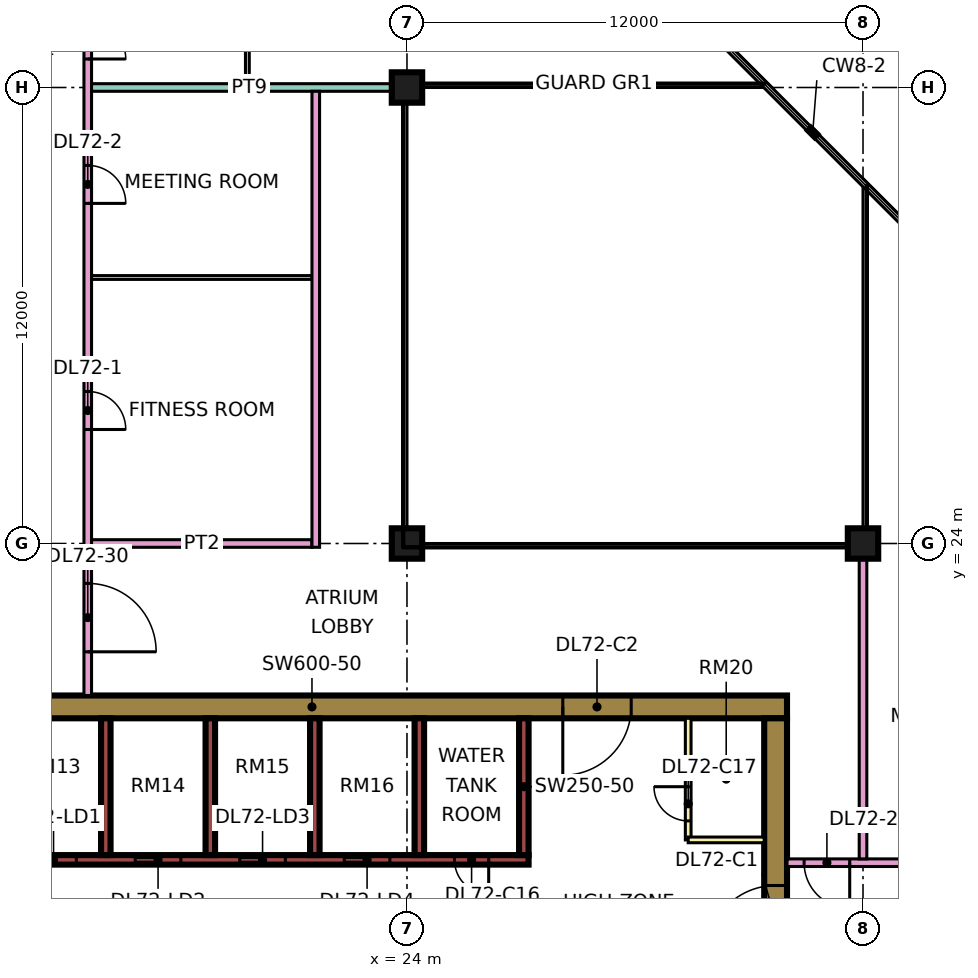
"""IFC4 building model, lengths in metres.
Left out: names, types, materials, properties, quantities, classifications, styles, units other than length and angle.
Written with IfcOpenShell. Run it as: python <this file> out.ifc"""

import sys

from ifc_helpers import new_model, si_unit, direction, frame, frame_2d, origin, origin_2d, place, context, subcontext, project, spatial, rectangle, extrude, element, fill, save


model = new_model("IFC4")
c1 = context("Model", 3, precision=1e-05, world=origin(), true_north=direction((0.0, 1.0)))
c2 = subcontext(c1, "Body", "Model", "MODEL_VIEW")
j1 = project(units=[si_unit("LENGTHUNIT", "METRE"), si_unit("PLANEANGLEUNIT", "RADIAN")], contexts=[c1])
p1 = place(None, origin())
s1 = spatial("IfcSite", under=j1, at=p1, CompositionType="ELEMENT")
p2 = place(p1, origin())
s2 = spatial("IfcBuilding", under=s1, at=p2, CompositionType="ELEMENT")
p3 = place(p2, frame((0.0, 0.0, 307.15)))
s3 = spatial("IfcBuildingStorey", under=s2, at=p3, CompositionType="ELEMENT", Elevation=307.15)
for number, where, z_axis, x_axis in (
    (1, (24.0, 24.0, 0.0), (0.0, 0.0, 1.0), (1.0, 0.0, 0.0)),
    (2, (24.0, 36.0, 0.0), (0.0, 0.0, 1.0), (1.0, 0.0, 0.0)),
    (3, (36.0, 24.0, 0.0), (0.0, 0.0, 1.0), (1.0, 0.0, 0.0)),
):
    element("IfcColumn", number, at=place(p3, frame(where, z_axis=z_axis, x_axis=x_axis)), inside=s3, PredefinedType="COLUMN", context=c2, shape_type="SweptSolid", body=[
        extrude(rectangle(XDim=0.8, YDim=0.8, at=origin_2d()), origin(), (0.0, 0.0, 1.0), 3.75),
    ])
p4 = place(p3, frame((9.0, 19.7, 0.0), z_axis=(0.0, 0.0, 1.0), x_axis=(1.0, 0.0, 0.0)))
e4 = element("IfcWall", 4, at=p4, inside=s3, PredefinedType="SHEAR", context=c2, shape_type="SweptSolid", body=[
    extrude(rectangle(XDim=25.0, YDim=0.6, at=frame_2d((12.5, 0.0))), origin(), (0.0, 0.0, 1.0), 3.75),
])
p5 = place(p4, frame((19.1, 0.0, 0.0)))
e5 = element("IfcOpeningElement", 5, at=p5, cuts=e4, PredefinedType="OPENING", context=c2, shape_type="SweptSolid", body=[
    extrude(rectangle(XDim=1.8, YDim=2.4, at=frame_2d((0.9, 1.2))), frame((0.0, 0.31, 0.0), z_axis=(0.0, -1.0, 0.0), x_axis=(1.0, 0.0, 0.0)), (0.0, 0.0, 1.0), 0.62),
])
p6 = place(p3, frame((33.7, 7.6, 0.0), z_axis=(0.0, 0.0, 1.0), x_axis=(0.0, 1.0, 0.0)))
e6 = element("IfcWall", 6, at=p6, inside=s3, PredefinedType="SHEAR", context=c2, shape_type="SweptSolid", body=[
    extrude(rectangle(XDim=11.8, YDim=0.6, at=frame_2d((5.9, 0.0))), origin(), (0.0, 0.0, 1.0), 3.75),
])
p7 = place(p6, frame((5.6, 0.0, 0.0)))
e7 = element("IfcOpeningElement", 7, at=p7, cuts=e6, PredefinedType="OPENING", context=c2, shape_type="SweptSolid", body=[
    extrude(rectangle(XDim=1.8, YDim=2.4, at=frame_2d((0.9, 1.2))), frame((0.0, 0.31, 0.0), z_axis=(0.0, -1.0, 0.0), x_axis=(1.0, 0.0, 0.0)), (0.0, 0.0, 1.0), 0.62),
])
p8 = place(p3, frame((13.45, 15.675, 0.0), z_axis=(0.0, 0.0, 1.0), x_axis=(1.0, 0.0, 0.0)))
e8 = element("IfcWall", 8, at=p8, inside=s3, PredefinedType="SHEAR", context=c2, shape_type="SweptSolid", body=[
    extrude(rectangle(XDim=13.75, YDim=0.25, at=frame_2d((6.875, 0.0))), origin(), (0.0, 0.0, 1.0), 3.75),
])
p9 = place(p8, frame((0.65, 0.0, 0.0)))
e9 = element("IfcOpeningElement", 9, at=p9, cuts=e8, PredefinedType="OPENING", context=c2, shape_type="SweptSolid", body=[
    extrude(rectangle(XDim=1.2, YDim=2.2, at=frame_2d((0.6, 1.1))), frame((0.0, 0.135, 0.0), z_axis=(0.0, -1.0, 0.0), x_axis=(1.0, 0.0, 0.0)), (0.0, 0.0, 1.0), 0.27),
])
p10 = place(p8, frame((3.4, 0.0, 0.0)))
e10 = element("IfcOpeningElement", 10, at=p10, cuts=e8, PredefinedType="OPENING", context=c2, shape_type="SweptSolid", body=[
    extrude(rectangle(XDim=1.2, YDim=2.2, at=frame_2d((0.6, 1.1))), frame((0.0, 0.135, 0.0), z_axis=(0.0, -1.0, 0.0), x_axis=(1.0, 0.0, 0.0)), (0.0, 0.0, 1.0), 0.27),
])
p11 = place(p8, frame((6.15, 0.0, 0.0)))
e11 = element("IfcOpeningElement", 11, at=p11, cuts=e8, PredefinedType="OPENING", context=c2, shape_type="SweptSolid", body=[
    extrude(rectangle(XDim=1.2, YDim=2.2, at=frame_2d((0.6, 1.1))), frame((0.0, 0.135, 0.0), z_axis=(0.0, -1.0, 0.0), x_axis=(1.0, 0.0, 0.0)), (0.0, 0.0, 1.0), 0.27),
])
p12 = place(p8, frame((8.9, 0.0, 0.0)))
e12 = element("IfcOpeningElement", 12, at=p12, cuts=e8, PredefinedType="OPENING", context=c2, shape_type="SweptSolid", body=[
    extrude(rectangle(XDim=1.2, YDim=2.2, at=frame_2d((0.6, 1.1))), frame((0.0, 0.135, 0.0), z_axis=(0.0, -1.0, 0.0), x_axis=(1.0, 0.0, 0.0)), (0.0, 0.0, 1.0), 0.27),
])
p13 = place(p8, frame((11.8, 0.0, 0.0)))
e13 = element("IfcOpeningElement", 13, at=p13, cuts=e8, PredefinedType="OPENING", context=c2, shape_type="SweptSolid", body=[
    extrude(rectangle(XDim=0.9, YDim=2.1, at=frame_2d((0.45, 1.05))), frame((0.0, 0.135, 0.0), z_axis=(0.0, -1.0, 0.0), x_axis=(1.0, 0.0, 0.0)), (0.0, 0.0, 1.0), 0.27),
])
for number, where, z_axis, x_axis in (
    (14, (16.075, 15.8, 0.0), (0.0, 0.0, 1.0), (0.0, 1.0, 0.0)),
    (15, (18.825, 15.8, 0.0), (0.0, 0.0, 1.0), (0.0, 1.0, 0.0)),
    (16, (21.575, 15.8, 0.0), (0.0, 0.0, 1.0), (0.0, 1.0, 0.0)),
    (17, (24.325, 15.8, 0.0), (0.0, 0.0, 1.0), (0.0, 1.0, 0.0)),
    (18, (27.075, 15.8, 0.0), (0.0, 0.0, 1.0), (0.0, 1.0, 0.0)),
):
    element("IfcWall", number, at=place(p3, frame(where, z_axis=z_axis, x_axis=x_axis)), inside=s3, PredefinedType="SHEAR", context=c2, shape_type="SweptSolid", body=[
        extrude(rectangle(XDim=3.6, YDim=0.25, at=frame_2d((1.8, 0.0))), origin(), (0.0, 0.0, 1.0), 3.75),
    ])
p14 = place(p3, frame((31.4, 16.2, 0.0), z_axis=(0.0, 0.0, 1.0), x_axis=(0.0, 1.0, 0.0)))
e19 = element("IfcWall", 19, at=p14, inside=s3, PredefinedType="PARTITIONING", context=c2, shape_type="SweptSolid", body=[
    extrude(rectangle(XDim=3.2, YDim=0.15, at=frame_2d((1.6, 0.0))), origin(), (0.0, 0.0, 1.0), 3.35),
])
p15 = place(p14, frame((0.5, 0.0, 0.0)))
e20 = element("IfcOpeningElement", 20, at=p15, cuts=e19, PredefinedType="OPENING", context=c2, shape_type="SweptSolid", body=[
    extrude(rectangle(XDim=0.9, YDim=2.1, at=frame_2d((0.45, 1.05))), frame((0.0, 0.085, 0.0), z_axis=(0.0, -1.0, 0.0), x_axis=(1.0, 0.0, 0.0)), (0.0, 0.0, 1.0), 0.17),
])
p16 = place(p3, frame((31.4, 16.2, 0.0), z_axis=(0.0, 0.0, 1.0), x_axis=(1.0, 0.0, 0.0)))
e21 = element("IfcWall", 21, at=p16, inside=s3, PredefinedType="PARTITIONING", context=c2, shape_type="SweptSolid", body=[
    extrude(rectangle(XDim=2.0, YDim=0.15, at=frame_2d((1.0, 0.0))), origin(), (0.0, 0.0, 1.0), 3.35),
])
p17 = place(p3, frame((15.6, 20.0, 0.0), z_axis=(0.0, 0.0, 1.0), x_axis=(0.0, 1.0, 0.0)))
e22 = element("IfcWall", 22, at=p17, inside=s3, PredefinedType="PARTITIONING", context=c2, shape_type="SweptSolid", body=[
    extrude(rectangle(XDim=27.775, YDim=0.2, at=frame_2d((13.887, 0.0))), origin(), (0.0, 0.0, 1.0), 3.35),
])
p18 = place(p17, frame((7.0, 0.0, 0.0)))
e23 = element("IfcOpeningElement", 23, at=p18, cuts=e22, PredefinedType="OPENING", context=c2, shape_type="SweptSolid", body=[
    extrude(rectangle(XDim=1.0, YDim=2.1, at=frame_2d((0.5, 1.05))), frame((0.0, 0.11, 0.0), z_axis=(0.0, -1.0, 0.0), x_axis=(1.0, 0.0, 0.0)), (0.0, 0.0, 1.0), 0.22),
])
p19 = place(p17, frame((12.95, 0.0, 0.0)))
e24 = element("IfcOpeningElement", 24, at=p19, cuts=e22, PredefinedType="OPENING", context=c2, shape_type="SweptSolid", body=[
    extrude(rectangle(XDim=1.0, YDim=2.1, at=frame_2d((0.5, 1.05))), frame((0.0, 0.11, 0.0), z_axis=(0.0, -1.0, 0.0), x_axis=(1.0, 0.0, 0.0)), (0.0, 0.0, 1.0), 0.22),
])
p20 = place(p17, frame((16.75, 0.0, 0.0)))
e25 = element("IfcOpeningElement", 25, at=p20, cuts=e22, PredefinedType="OPENING", context=c2, shape_type="SweptSolid", body=[
    extrude(rectangle(XDim=1.0, YDim=2.1, at=frame_2d((0.5, 1.05))), frame((0.0, 0.11, 0.0), z_axis=(0.0, -1.0, 0.0), x_axis=(1.0, 0.0, 0.0)), (0.0, 0.0, 1.0), 0.22),
])
p21 = place(p17, frame((1.15, 0.0, 0.0)))
e26 = element("IfcOpeningElement", 26, at=p21, cuts=e22, PredefinedType="OPENING", context=c2, shape_type="SweptSolid", body=[
    extrude(rectangle(XDim=1.8, YDim=2.1, at=frame_2d((0.9, 1.05))), frame((0.0, 0.11, 0.0), z_axis=(0.0, -1.0, 0.0), x_axis=(1.0, 0.0, 0.0)), (0.0, 0.0, 1.0), 0.22),
])
p22 = place(p17, frame((25.9, 0.0, 0.0)))
e27 = element("IfcOpeningElement", 27, at=p22, cuts=e22, PredefinedType="OPENING", context=c2, shape_type="SweptSolid", body=[
    extrude(rectangle(XDim=1.0, YDim=2.1, at=frame_2d((0.5, 1.05))), frame((0.0, 0.11, 0.0), z_axis=(0.0, -1.0, 0.0), x_axis=(1.0, 0.0, 0.0)), (0.0, 0.0, 1.0), 0.22),
])
p23 = place(p3, frame((15.7, 24.0, 0.0), z_axis=(0.0, 0.0, 1.0), x_axis=(1.0, 0.0, 0.0)))
e28 = element("IfcWall", 28, at=p23, inside=s3, PredefinedType="PARTITIONING", context=c2, shape_type="SweptSolid", body=[
    extrude(rectangle(XDim=5.8, YDim=0.2, at=frame_2d((2.9, 0.0))), origin(), (0.0, 0.0, 1.0), 3.35),
])
p24 = place(p3, frame((15.7, 31.0, 0.0), z_axis=(0.0, 0.0, 1.0), x_axis=(1.0, 0.0, 0.0)))
e29 = element("IfcWall", 29, at=p24, inside=s3, PredefinedType="PARTITIONING", context=c2, shape_type="SweptSolid", body=[
    extrude(rectangle(XDim=5.8, YDim=0.1, at=frame_2d((2.9, 0.0))), origin(), (0.0, 0.0, 1.0), 3.35),
])
p25 = place(p3, frame((15.7, 36.0, 0.0), z_axis=(0.0, 0.0, 1.0), x_axis=(1.0, 0.0, 0.0)))
e30 = element("IfcWall", 30, at=p25, inside=s3, PredefinedType="PARTITIONING", context=c2, shape_type="SweptSolid", body=[
    extrude(rectangle(XDim=8.3, YDim=0.2, at=frame_2d((4.15, 0.0))), origin(), (0.0, 0.0, 1.0), 3.35),
])
p26 = place(p3, frame((19.8, 36.1, 0.0), z_axis=(0.0, 0.0, 1.0), x_axis=(0.0, 1.0, 0.0)))
e31 = element("IfcWall", 31, at=p26, inside=s3, PredefinedType="PARTITIONING", context=c2, shape_type="SweptSolid", body=[
    extrude(rectangle(XDim=5.95, YDim=0.1, at=frame_2d((2.975, 0.0))), origin(), (0.0, 0.0, 1.0), 3.35),
])
p27 = place(p26, frame((0.95, 0.0, 0.0)))
e32 = element("IfcOpeningElement", 32, at=p27, cuts=e31, PredefinedType="OPENING", context=c2, shape_type="SweptSolid", body=[
    extrude(rectangle(XDim=0.9, YDim=2.1, at=frame_2d((0.45, 1.05))), frame((0.0, 0.06, 0.0), z_axis=(0.0, -1.0, 0.0), x_axis=(1.0, 0.0, 0.0)), (0.0, 0.0, 1.0), 0.12),
])
p28 = place(p3, frame((21.6, 23.9, 0.0), z_axis=(0.0, 0.0, 1.0), x_axis=(0.0, 1.0, 0.0)))
e33 = element("IfcWall", 33, at=p28, inside=s3, PredefinedType="PARTITIONING", context=c2, shape_type="SweptSolid", body=[
    extrude(rectangle(XDim=12.0, YDim=0.2, at=frame_2d((6.0, 0.0))), origin(), (0.0, 0.0, 1.0), 3.35),
])
p29 = place(p3, frame((34.0, 15.6, 0.0), z_axis=(0.0, 0.0, 1.0), x_axis=(1.0, 0.0, 0.0)))
e34 = element("IfcWall", 34, at=p29, inside=s3, PredefinedType="PARTITIONING", context=c2, shape_type="SweptSolid", body=[
    extrude(rectangle(XDim=10.35, YDim=0.2, at=frame_2d((5.175, 0.0))), origin(), (0.0, 0.0, 1.0), 3.35),
])
p30 = place(p29, frame((5.6, 0.0, 0.0)))
e35 = element("IfcOpeningElement", 35, at=p30, cuts=e34, PredefinedType="OPENING", context=c2, shape_type="SweptSolid", body=[
    extrude(rectangle(XDim=1.0, YDim=2.1, at=frame_2d((0.5, 1.05))), frame((0.0, 0.11, 0.0), z_axis=(0.0, -1.0, 0.0), x_axis=(1.0, 0.0, 0.0)), (0.0, 0.0, 1.0), 0.22),
])
p31 = place(p29, frame((0.45, 0.0, 0.0)))
e36 = element("IfcOpeningElement", 36, at=p31, cuts=e34, PredefinedType="OPENING", context=c2, shape_type="SweptSolid", body=[
    extrude(rectangle(XDim=1.2, YDim=2.1, at=frame_2d((0.6, 1.05))), frame((0.0, 0.11, 0.0), z_axis=(0.0, -1.0, 0.0), x_axis=(1.0, 0.0, 0.0)), (0.0, 0.0, 1.0), 0.22),
])
p32 = place(p3, frame((36.0, 15.7, 0.0), z_axis=(0.0, 0.0, 1.0), x_axis=(0.0, 1.0, 0.0)))
e37 = element("IfcWall", 37, at=p32, inside=s3, PredefinedType="PARTITIONING", context=c2, shape_type="SweptSolid", body=[
    extrude(rectangle(XDim=8.3, YDim=0.2, at=frame_2d((4.15, 0.0))), origin(), (0.0, 0.0, 1.0), 3.35),
])
p33 = place(p9, origin())
e38 = element("IfcDoor", 38, at=p33, inside=s3, OperationType="DOUBLE_DOOR_SLIDING", PredefinedType="DOOR", context=c2, shape_type="SweptSolid", body=[
    extrude(rectangle(XDim=1.2, YDim=2.2, at=frame_2d((0.6, 1.1))), frame((0.0, 0.025, 0.0), z_axis=(0.0, -1.0, 0.0), x_axis=(1.0, 0.0, 0.0)), (0.0, 0.0, 1.0), 0.05),
])
fill(e9, e38)
p34 = place(p10, origin())
e39 = element("IfcDoor", 39, at=p34, inside=s3, OperationType="DOUBLE_DOOR_SLIDING", PredefinedType="DOOR", context=c2, shape_type="SweptSolid", body=[
    extrude(rectangle(XDim=1.2, YDim=2.2, at=frame_2d((0.6, 1.1))), frame((0.0, 0.025, 0.0), z_axis=(0.0, -1.0, 0.0), x_axis=(1.0, 0.0, 0.0)), (0.0, 0.0, 1.0), 0.05),
])
fill(e10, e39)
p35 = place(p11, origin())
e40 = element("IfcDoor", 40, at=p35, inside=s3, OperationType="DOUBLE_DOOR_SLIDING", PredefinedType="DOOR", context=c2, shape_type="SweptSolid", body=[
    extrude(rectangle(XDim=1.2, YDim=2.2, at=frame_2d((0.6, 1.1))), frame((0.0, 0.025, 0.0), z_axis=(0.0, -1.0, 0.0), x_axis=(1.0, 0.0, 0.0)), (0.0, 0.0, 1.0), 0.05),
])
fill(e11, e40)
p36 = place(p12, origin())
e41 = element("IfcDoor", 41, at=p36, inside=s3, OperationType="DOUBLE_DOOR_SLIDING", PredefinedType="DOOR", context=c2, shape_type="SweptSolid", body=[
    extrude(rectangle(XDim=1.2, YDim=2.2, at=frame_2d((0.6, 1.1))), frame((0.0, 0.025, 0.0), z_axis=(0.0, -1.0, 0.0), x_axis=(1.0, 0.0, 0.0)), (0.0, 0.0, 1.0), 0.05),
])
fill(e12, e41)
p37 = place(p7, origin())
e42 = element("IfcDoor", 42, at=p37, inside=s3, OperationType="DOUBLE_DOOR_SINGLE_SWING", PredefinedType="DOOR", context=c2, shape_type="SweptSolid", body=[
    extrude(rectangle(XDim=1.8, YDim=2.4, at=frame_2d((0.9, 1.2))), frame((0.0, 0.025, 0.0), z_axis=(0.0, -1.0, 0.0), x_axis=(1.0, 0.0, 0.0)), (0.0, 0.0, 1.0), 0.05),
])
fill(e7, e42)
p38 = place(p5, frame((1.8, 0.0, 0.0), z_axis=(0.0, 0.0, 1.0), x_axis=(-1.0, 0.0, 0.0)))
e43 = element("IfcDoor", 43, at=p38, inside=s3, OperationType="DOUBLE_DOOR_SINGLE_SWING", PredefinedType="DOOR", context=c2, shape_type="SweptSolid", body=[
    extrude(rectangle(XDim=1.8, YDim=2.4, at=frame_2d((0.9, 1.2))), frame((0.0, 0.025, 0.0), z_axis=(0.0, -1.0, 0.0), x_axis=(1.0, 0.0, 0.0)), (0.0, 0.0, 1.0), 0.05),
])
fill(e5, e43)
p39 = place(p13, origin())
e44 = element("IfcDoor", 44, at=p39, inside=s3, OperationType="SINGLE_SWING_RIGHT", PredefinedType="DOOR", context=c2, shape_type="SweptSolid", body=[
    extrude(rectangle(XDim=0.9, YDim=2.1, at=frame_2d((0.45, 1.05))), frame((0.0, 0.025, 0.0), z_axis=(0.0, -1.0, 0.0), x_axis=(1.0, 0.0, 0.0)), (0.0, 0.0, 1.0), 0.05),
])
fill(e13, e44)
p40 = place(p15, frame((0.9, 0.0, 0.0), z_axis=(0.0, 0.0, 1.0), x_axis=(-1.0, 0.0, 0.0)))
e45 = element("IfcDoor", 45, at=p40, inside=s3, OperationType="SINGLE_SWING_RIGHT", PredefinedType="DOOR", context=c2, shape_type="SweptSolid", body=[
    extrude(rectangle(XDim=0.9, YDim=2.1, at=frame_2d((0.45, 1.05))), frame((0.0, 0.025, 0.0), z_axis=(0.0, -1.0, 0.0), x_axis=(1.0, 0.0, 0.0)), (0.0, 0.0, 1.0), 0.05),
])
fill(e20, e45)
p41 = place(p18, frame((1.0, 0.0, 0.0), z_axis=(0.0, 0.0, 1.0), x_axis=(-1.0, 0.0, 0.0)))
e46 = element("IfcDoor", 46, at=p41, inside=s3, OperationType="SINGLE_SWING_LEFT", PredefinedType="DOOR", context=c2, shape_type="SweptSolid", body=[
    extrude(rectangle(XDim=1.0, YDim=2.1, at=frame_2d((0.5, 1.05))), frame((0.0, 0.025, 0.0), z_axis=(0.0, -1.0, 0.0), x_axis=(1.0, 0.0, 0.0)), (0.0, 0.0, 1.0), 0.05),
])
fill(e23, e46)
p42 = place(p19, frame((1.0, 0.0, 0.0), z_axis=(0.0, 0.0, 1.0), x_axis=(-1.0, 0.0, 0.0)))
e47 = element("IfcDoor", 47, at=p42, inside=s3, OperationType="SINGLE_SWING_LEFT", PredefinedType="DOOR", context=c2, shape_type="SweptSolid", body=[
    extrude(rectangle(XDim=1.0, YDim=2.1, at=frame_2d((0.5, 1.05))), frame((0.0, 0.025, 0.0), z_axis=(0.0, -1.0, 0.0), x_axis=(1.0, 0.0, 0.0)), (0.0, 0.0, 1.0), 0.05),
])
fill(e24, e47)
p43 = place(p20, frame((1.0, 0.0, 0.0), z_axis=(0.0, 0.0, 1.0), x_axis=(-1.0, 0.0, 0.0)))
e48 = element("IfcDoor", 48, at=p43, inside=s3, OperationType="SINGLE_SWING_LEFT", PredefinedType="DOOR", context=c2, shape_type="SweptSolid", body=[
    extrude(rectangle(XDim=1.0, YDim=2.1, at=frame_2d((0.5, 1.05))), frame((0.0, 0.025, 0.0), z_axis=(0.0, -1.0, 0.0), x_axis=(1.0, 0.0, 0.0)), (0.0, 0.0, 1.0), 0.05),
])
fill(e25, e48)
p44 = place(p31, origin())
e49 = element("IfcDoor", 49, at=p44, inside=s3, OperationType="SINGLE_SWING_RIGHT", PredefinedType="DOOR", context=c2, shape_type="SweptSolid", body=[
    extrude(rectangle(XDim=1.2, YDim=2.1, at=frame_2d((0.6, 1.05))), frame((0.0, 0.025, 0.0), z_axis=(0.0, -1.0, 0.0), x_axis=(1.0, 0.0, 0.0)), (0.0, 0.0, 1.0), 0.05),
])
fill(e36, e49)
p45 = place(p21, frame((1.8, 0.0, 0.0), z_axis=(0.0, 0.0, 1.0), x_axis=(-1.0, 0.0, 0.0)))
e50 = element("IfcDoor", 50, at=p45, inside=s3, OperationType="DOUBLE_DOOR_SINGLE_SWING", PredefinedType="DOOR", context=c2, shape_type="SweptSolid", body=[
    extrude(rectangle(XDim=1.8, YDim=2.1, at=frame_2d((0.9, 1.05))), frame((0.0, 0.025, 0.0), z_axis=(0.0, -1.0, 0.0), x_axis=(1.0, 0.0, 0.0)), (0.0, 0.0, 1.0), 0.05),
])
fill(e26, e50)
save(model, sys.argv[1])
